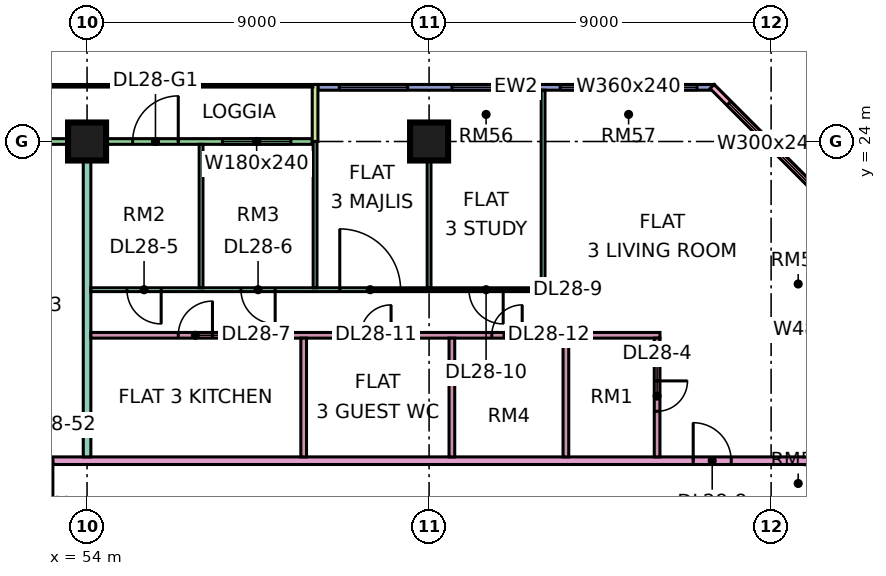
"""IFC4 building model, lengths in metres.
Left out: names, types, materials, properties, quantities, classifications, styles, units other than length and angle.
Written with IfcOpenShell. Run it as: python <this file> out.ifc"""

import sys

from ifc_helpers import new_model, si_unit, direction, frame, frame_2d, origin, origin_2d, place, context, subcontext, project, spatial, rectangle, extrude, element, fill, save


model = new_model("IFC4")
c1 = context("Model", 3, precision=1e-05, world=origin(), true_north=direction((0.0, 1.0)))
c2 = subcontext(c1, "Body", "Model", "MODEL_VIEW")
j1 = project(units=[si_unit("LENGTHUNIT", "METRE"), si_unit("PLANEANGLEUNIT", "RADIAN")], contexts=[c1])
p1 = place(None, origin())
s1 = spatial("IfcSite", under=j1, at=p1, CompositionType="ELEMENT")
p2 = place(p1, origin())
s2 = spatial("IfcBuilding", under=s1, at=p2, CompositionType="ELEMENT")
p3 = place(p2, frame((0.0, 0.0, 121.9)))
s3 = spatial("IfcBuildingStorey", under=s2, at=p3, CompositionType="ELEMENT", Elevation=121.9)
for number, where, z_axis, x_axis in (
    (1, (54.0, 24.0, 0.0), (0.0, 0.0, 1.0), (1.0, 0.0, 0.0)),
    (2, (63.0, 24.0, 0.0), (0.0, 0.0, 1.0), (1.0, 0.0, 0.0)),
):
    element("IfcColumn", number, at=place(p3, frame(where, z_axis=z_axis, x_axis=x_axis)), inside=s3, PredefinedType="COLUMN", context=c2, shape_type="SweptSolid", body=[
        extrude(rectangle(XDim=1.0, YDim=1.0, at=origin_2d()), origin(), (0.0, 0.0, 1.0), 3.75),
    ])
p4 = place(p3, frame((70.5, 25.425, 0.0), z_axis=(0.0, 0.0, 1.0), x_axis=(-1.0, 0.0, 0.0)))
e3 = element("IfcWall", 3, at=p4, inside=s3, PredefinedType="SOLIDWALL", context=c2, shape_type="SweptSolid", body=[
    extrude(rectangle(XDim=10.425, YDim=0.15, at=frame_2d((5.212, 0.0))), origin(), (0.0, 0.0, 1.0), 3.35),
])
p5 = place(p4, frame((0.45, 0.0, 0.45)))
e4 = element("IfcOpeningElement", 4, at=p5, cuts=e3, PredefinedType="OPENING", context=c2, shape_type="SweptSolid", body=[
    extrude(rectangle(XDim=3.6, YDim=2.4, at=frame_2d((1.8, 1.2))), frame((0.0, 0.085, 0.0), z_axis=(0.0, -1.0, 0.0), x_axis=(1.0, 0.0, 0.0)), (0.0, 0.0, 1.0), 0.17),
])
p6 = place(p4, frame((5.1, 0.0, 0.45)))
e5 = element("IfcOpeningElement", 5, at=p6, cuts=e3, PredefinedType="OPENING", context=c2, shape_type="SweptSolid", body=[
    extrude(rectangle(XDim=1.8, YDim=2.4, at=frame_2d((0.9, 1.2))), frame((0.0, 0.085, 0.0), z_axis=(0.0, -1.0, 0.0), x_axis=(1.0, 0.0, 0.0)), (0.0, 0.0, 1.0), 0.17),
])
p7 = place(p4, frame((8.062, 0.0, 0.45)))
e6 = element("IfcOpeningElement", 6, at=p7, cuts=e3, PredefinedType="OPENING", context=c2, shape_type="SweptSolid", body=[
    extrude(rectangle(XDim=1.8, YDim=2.4, at=frame_2d((0.9, 1.2))), frame((0.0, 0.085, 0.0), z_axis=(0.0, -1.0, 0.0), x_axis=(1.0, 0.0, 0.0)), (0.0, 0.0, 1.0), 0.17),
])
p8 = place(p3, frame((59.925, 24.0, 0.0), z_axis=(0.0, 0.0, 1.0), x_axis=(-1.0, 0.0, 0.0)))
e7 = element("IfcWall", 7, at=p8, inside=s3, PredefinedType="SOLIDWALL", context=c2, shape_type="SweptSolid", body=[
    extrude(rectangle(XDim=11.85, YDim=0.15, at=frame_2d((5.925, 0.0))), origin(), (0.0, 0.0, 1.0), 3.35),
])
p9 = place(p8, frame((0.562, 0.0, 0.45)))
e8 = element("IfcOpeningElement", 8, at=p9, cuts=e7, PredefinedType="OPENING", context=c2, shape_type="SweptSolid", body=[
    extrude(rectangle(XDim=1.8, YDim=2.4, at=frame_2d((0.9, 1.2))), frame((0.0, 0.085, 0.0), z_axis=(0.0, -1.0, 0.0), x_axis=(1.0, 0.0, 0.0)), (0.0, 0.0, 1.0), 0.17),
])
p10 = place(p8, frame((3.525, 0.0, 0.0)))
e9 = element("IfcOpeningElement", 9, at=p10, cuts=e7, PredefinedType="OPENING", context=c2, shape_type="SweptSolid", body=[
    extrude(rectangle(XDim=1.2, YDim=2.4, at=frame_2d((0.6, 1.2))), frame((0.0, 0.085, 0.0), z_axis=(0.0, -1.0, 0.0), x_axis=(1.0, 0.0, 0.0)), (0.0, 0.0, 1.0), 0.17),
])
p11 = place(p8, frame((7.087, 0.0, 0.45)))
e10 = element("IfcOpeningElement", 10, at=p11, cuts=e7, PredefinedType="OPENING", context=c2, shape_type="SweptSolid", body=[
    extrude(rectangle(XDim=4.2, YDim=2.4, at=frame_2d((2.1, 1.2))), frame((0.0, 0.085, 0.0), z_axis=(0.0, -1.0, 0.0), x_axis=(1.0, 0.0, 0.0)), (0.0, 0.0, 1.0), 0.17),
])
p12 = place(p3, frame((60.0, 25.5, 0.0), z_axis=(0.0, 0.0, 1.0), x_axis=(0.0, -1.0, 0.0)))
e11 = element("IfcWall", 11, at=p12, inside=s3, PredefinedType="SOLIDWALL", context=c2, shape_type="SweptSolid", body=[
    extrude(rectangle(XDim=1.5, YDim=0.15, at=frame_2d((0.75, 0.0))), origin(), (0.0, 0.0, 1.0), 3.35),
])
p13 = place(p3, frame((73.447, 22.447, 0.0), z_axis=(0.0, 0.0, 1.0), x_axis=(-0.707106781187, 0.707106781187, 0.0)))
e12 = element("IfcWall", 12, at=p13, inside=s3, PredefinedType="SOLIDWALL", context=c2, shape_type="SweptSolid", body=[
    extrude(rectangle(XDim=4.243, YDim=0.15, at=frame_2d((2.121, 0.0))), origin(), (0.0, 0.0, 1.0), 3.35),
])
p14 = place(p13, frame((0.621, 0.0, 0.45)))
e13 = element("IfcOpeningElement", 13, at=p14, cuts=e12, PredefinedType="OPENING", context=c2, shape_type="SweptSolid", body=[
    extrude(rectangle(XDim=3.0, YDim=2.4, at=frame_2d((1.5, 1.2))), frame((0.0, 0.085, 0.0), z_axis=(0.0, -1.0, 0.0), x_axis=(1.0, 0.0, 0.0)), (0.0, 0.0, 1.0), 0.17),
])
p15 = place(p3, frame((51.225, 15.6, 0.0), z_axis=(0.0, 0.0, 1.0), x_axis=(1.0, 0.0, 0.0)))
e14 = element("IfcWall", 14, at=p15, inside=s3, PredefinedType="PARTITIONING", context=c2, shape_type="SweptSolid", body=[
    extrude(rectangle(XDim=22.125, YDim=0.2, at=frame_2d((11.062, 0.0))), origin(), (0.0, 0.0, 1.0), 3.35),
])
p16 = place(p15, frame((18.725, 0.0, 0.0)))
e15 = element("IfcOpeningElement", 15, at=p16, cuts=e14, PredefinedType="OPENING", context=c2, shape_type="SweptSolid", body=[
    extrude(rectangle(XDim=1.0, YDim=2.1, at=frame_2d((0.5, 1.05))), frame((0.0, 0.11, 0.0), z_axis=(0.0, -1.0, 0.0), x_axis=(1.0, 0.0, 0.0)), (0.0, 0.0, 1.0), 0.22),
])
p17 = place(p15, frame((0.875, 0.0, 0.0)))
e16 = element("IfcOpeningElement", 16, at=p17, cuts=e14, PredefinedType="OPENING", context=c2, shape_type="SweptSolid", body=[
    extrude(rectangle(XDim=1.0, YDim=2.1, at=frame_2d((0.5, 1.05))), frame((0.0, 0.11, 0.0), z_axis=(0.0, -1.0, 0.0), x_axis=(1.0, 0.0, 0.0)), (0.0, 0.0, 1.0), 0.22),
])
p18 = place(p3, frame((54.0, 15.7, 0.0), z_axis=(0.0, 0.0, 1.0), x_axis=(0.0, 1.0, 0.0)))
e17 = element("IfcWall", 17, at=p18, inside=s3, PredefinedType="PARTITIONING", context=c2, shape_type="SweptSolid", body=[
    extrude(rectangle(XDim=8.226, YDim=0.2, at=frame_2d((4.113, 0.0))), origin(), (0.0, 0.0, 1.0), 3.35),
])
p19 = place(p3, frame((54.1, 18.9, 0.0), z_axis=(0.0, 0.0, 1.0), x_axis=(1.0, 0.0, 0.0)))
e18 = element("IfcWall", 18, at=p19, inside=s3, PredefinedType="PARTITIONING", context=c2, shape_type="SweptSolid", body=[
    extrude(rectangle(XDim=14.975, YDim=0.15, at=frame_2d((7.487, 0.0))), origin(), (0.0, 0.0, 1.0), 3.35),
])
p20 = place(p19, frame((2.3, 0.0, 0.0)))
e19 = element("IfcOpeningElement", 19, at=p20, cuts=e18, PredefinedType="OPENING", context=c2, shape_type="SweptSolid", body=[
    extrude(rectangle(XDim=0.9, YDim=2.1, at=frame_2d((0.45, 1.05))), frame((0.0, 0.085, 0.0), z_axis=(0.0, -1.0, 0.0), x_axis=(1.0, 0.0, 0.0)), (0.0, 0.0, 1.0), 0.17),
])
p21 = place(p19, frame((7.1, 0.0, 0.0)))
e20 = element("IfcOpeningElement", 20, at=p21, cuts=e18, PredefinedType="OPENING", context=c2, shape_type="SweptSolid", body=[
    extrude(rectangle(XDim=0.8, YDim=2.1, at=frame_2d((0.4, 1.05))), frame((0.0, 0.085, 0.0), z_axis=(0.0, -1.0, 0.0), x_axis=(1.0, 0.0, 0.0)), (0.0, 0.0, 1.0), 0.17),
])
p22 = place(p19, frame((10.55, 0.0, 0.0)))
e21 = element("IfcOpeningElement", 21, at=p22, cuts=e18, PredefinedType="OPENING", context=c2, shape_type="SweptSolid", body=[
    extrude(rectangle(XDim=0.8, YDim=2.1, at=frame_2d((0.4, 1.05))), frame((0.0, 0.085, 0.0), z_axis=(0.0, -1.0, 0.0), x_axis=(1.0, 0.0, 0.0)), (0.0, 0.0, 1.0), 0.17),
])
p23 = place(p3, frame((54.1, 20.1, 0.0), z_axis=(0.0, 0.0, 1.0), x_axis=(1.0, 0.0, 0.0)))
e22 = element("IfcWall", 22, at=p23, inside=s3, PredefinedType="PARTITIONING", context=c2, shape_type="SweptSolid", body=[
    extrude(rectangle(XDim=11.95, YDim=0.1, at=frame_2d((5.975, 0.0))), origin(), (0.0, 0.0, 1.0), 3.35),
])
p24 = place(p23, frame((0.95, 0.0, 0.0)))
e23 = element("IfcOpeningElement", 23, at=p24, cuts=e22, PredefinedType="OPENING", context=c2, shape_type="SweptSolid", body=[
    extrude(rectangle(XDim=0.9, YDim=2.1, at=frame_2d((0.45, 1.05))), frame((0.0, 0.06, 0.0), z_axis=(0.0, -1.0, 0.0), x_axis=(1.0, 0.0, 0.0)), (0.0, 0.0, 1.0), 0.12),
])
p25 = place(p23, frame((3.95, 0.0, 0.0)))
e24 = element("IfcOpeningElement", 24, at=p25, cuts=e22, PredefinedType="OPENING", context=c2, shape_type="SweptSolid", body=[
    extrude(rectangle(XDim=0.9, YDim=2.1, at=frame_2d((0.45, 1.05))), frame((0.0, 0.06, 0.0), z_axis=(0.0, -1.0, 0.0), x_axis=(1.0, 0.0, 0.0)), (0.0, 0.0, 1.0), 0.12),
])
p26 = place(p23, frame((6.55, 0.0, 0.0)))
e25 = element("IfcOpeningElement", 25, at=p26, cuts=e22, PredefinedType="OPENING", context=c2, shape_type="SweptSolid", body=[
    extrude(rectangle(XDim=1.6, YDim=2.1, at=frame_2d((0.8, 1.05))), frame((0.0, 0.06, 0.0), z_axis=(0.0, -1.0, 0.0), x_axis=(1.0, 0.0, 0.0)), (0.0, 0.0, 1.0), 0.12),
])
p27 = place(p23, frame((9.95, 0.0, 0.0)))
e26 = element("IfcOpeningElement", 26, at=p27, cuts=e22, PredefinedType="OPENING", context=c2, shape_type="SweptSolid", body=[
    extrude(rectangle(XDim=0.9, YDim=2.1, at=frame_2d((0.45, 1.05))), frame((0.0, 0.06, 0.0), z_axis=(0.0, -1.0, 0.0), x_axis=(1.0, 0.0, 0.0)), (0.0, 0.0, 1.0), 0.12),
])
p28 = place(p3, frame((57.0, 20.15, 0.0), z_axis=(0.0, 0.0, 1.0), x_axis=(0.0, 1.0, 0.0)))
e27 = element("IfcWall", 27, at=p28, inside=s3, PredefinedType="PARTITIONING", context=c2, shape_type="SweptSolid", body=[
    extrude(rectangle(XDim=3.776, YDim=0.1, at=frame_2d((1.888, 0.0))), origin(), (0.0, 0.0, 1.0), 3.35),
])
p29 = place(p3, frame((59.7, 15.7, 0.0), z_axis=(0.0, 0.0, 1.0), x_axis=(0.0, 1.0, 0.0)))
e28 = element("IfcWall", 28, at=p29, inside=s3, PredefinedType="PARTITIONING", context=c2, shape_type="SweptSolid", body=[
    extrude(rectangle(XDim=3.125, YDim=0.15, at=frame_2d((1.562, 0.0))), origin(), (0.0, 0.0, 1.0), 3.35),
])
for number, where, z_axis, x_axis in (
    (29, (60.0, 20.15, 0.0), (0.0, 0.0, 1.0), (0.0, 1.0, 0.0)),
    (30, (63.0, 20.15, 0.0), (0.0, 0.0, 1.0), (0.0, 1.0, 0.0)),
):
    element("IfcWall", number, at=place(p3, frame(where, z_axis=z_axis, x_axis=x_axis)), inside=s3, PredefinedType="PARTITIONING", context=c2, shape_type="SweptSolid", body=[
        extrude(rectangle(XDim=3.85, YDim=0.1, at=frame_2d((1.925, 0.0))), origin(), (0.0, 0.0, 1.0), 3.35),
    ])
p30 = place(p3, frame((63.6, 15.7, 0.0), z_axis=(0.0, 0.0, 1.0), x_axis=(0.0, 1.0, 0.0)))
e31 = element("IfcWall", 31, at=p30, inside=s3, PredefinedType="PARTITIONING", context=c2, shape_type="SweptSolid", body=[
    extrude(rectangle(XDim=3.125, YDim=0.15, at=frame_2d((1.562, 0.0))), origin(), (0.0, 0.0, 1.0), 3.35),
])
p31 = place(p3, frame((66.0, 20.15, 0.0), z_axis=(0.0, 0.0, 1.0), x_axis=(0.0, 1.0, 0.0)))
e32 = element("IfcWall", 32, at=p31, inside=s3, PredefinedType="PARTITIONING", context=c2, shape_type="SweptSolid", body=[
    extrude(rectangle(XDim=5.2, YDim=0.1, at=frame_2d((2.6, 0.0))), origin(), (0.0, 0.0, 1.0), 3.35),
])
p32 = place(p3, frame((66.6, 15.7, 0.0), z_axis=(0.0, 0.0, 1.0), x_axis=(0.0, 1.0, 0.0)))
e33 = element("IfcWall", 33, at=p32, inside=s3, PredefinedType="PARTITIONING", context=c2, shape_type="SweptSolid", body=[
    extrude(rectangle(XDim=3.125, YDim=0.15, at=frame_2d((1.562, 0.0))), origin(), (0.0, 0.0, 1.0), 3.35),
])
p33 = place(p3, frame((69.0, 15.7, 0.0), z_axis=(0.0, 0.0, 1.0), x_axis=(0.0, 1.0, 0.0)))
e34 = element("IfcWall", 34, at=p33, inside=s3, PredefinedType="PARTITIONING", context=c2, shape_type="SweptSolid", body=[
    extrude(rectangle(XDim=3.125, YDim=0.15, at=frame_2d((1.562, 0.0))), origin(), (0.0, 0.0, 1.0), 3.35),
])
p34 = place(p33, frame((1.2, 0.0, 0.0)))
e35 = element("IfcOpeningElement", 35, at=p34, cuts=e34, PredefinedType="OPENING", context=c2, shape_type="SweptSolid", body=[
    extrude(rectangle(XDim=0.8, YDim=2.1, at=frame_2d((0.4, 1.05))), frame((0.0, 0.085, 0.0), z_axis=(0.0, -1.0, 0.0), x_axis=(1.0, 0.0, 0.0)), (0.0, 0.0, 1.0), 0.17),
])
p35 = place(p5, origin())
e36 = element("IfcWindow", 36, at=p35, inside=s3, PartitioningType="SINGLE_PANEL", PredefinedType="WINDOW", context=c2, shape_type="SweptSolid", body=[
    extrude(rectangle(XDim=3.6, YDim=2.4, at=frame_2d((1.8, 1.2))), frame((0.0, 0.03, 0.0), z_axis=(0.0, -1.0, 0.0), x_axis=(1.0, 0.0, 0.0)), (0.0, 0.0, 1.0), 0.06),
])
fill(e4, e36)
p36 = place(p6, origin())
e37 = element("IfcWindow", 37, at=p36, inside=s3, PartitioningType="SINGLE_PANEL", PredefinedType="WINDOW", context=c2, shape_type="SweptSolid", body=[
    extrude(rectangle(XDim=1.8, YDim=2.4, at=frame_2d((0.9, 1.2))), frame((0.0, 0.03, 0.0), z_axis=(0.0, -1.0, 0.0), x_axis=(1.0, 0.0, 0.0)), (0.0, 0.0, 1.0), 0.06),
])
fill(e5, e37)
p37 = place(p7, origin())
e38 = element("IfcWindow", 38, at=p37, inside=s3, PartitioningType="SINGLE_PANEL", PredefinedType="WINDOW", context=c2, shape_type="SweptSolid", body=[
    extrude(rectangle(XDim=1.8, YDim=2.4, at=frame_2d((0.9, 1.2))), frame((0.0, 0.03, 0.0), z_axis=(0.0, -1.0, 0.0), x_axis=(1.0, 0.0, 0.0)), (0.0, 0.0, 1.0), 0.06),
])
fill(e6, e38)
p38 = place(p9, origin())
e39 = element("IfcWindow", 39, at=p38, inside=s3, PartitioningType="SINGLE_PANEL", PredefinedType="WINDOW", context=c2, shape_type="SweptSolid", body=[
    extrude(rectangle(XDim=1.8, YDim=2.4, at=frame_2d((0.9, 1.2))), frame((0.0, 0.03, 0.0), z_axis=(0.0, -1.0, 0.0), x_axis=(1.0, 0.0, 0.0)), (0.0, 0.0, 1.0), 0.06),
])
fill(e8, e39)
p39 = place(p10, frame((1.2, 0.0, 0.0), z_axis=(0.0, 0.0, 1.0), x_axis=(-1.0, 0.0, 0.0)))
e40 = element("IfcDoor", 40, at=p39, inside=s3, OperationType="DOUBLE_DOOR_SINGLE_SWING", PredefinedType="DOOR", context=c2, shape_type="SweptSolid", body=[
    extrude(rectangle(XDim=1.2, YDim=2.4, at=frame_2d((0.6, 1.2))), frame((0.0, 0.025, 0.0), z_axis=(0.0, -1.0, 0.0), x_axis=(1.0, 0.0, 0.0)), (0.0, 0.0, 1.0), 0.05),
])
fill(e9, e40)
p40 = place(p14, origin())
e41 = element("IfcWindow", 41, at=p40, inside=s3, PartitioningType="SINGLE_PANEL", PredefinedType="WINDOW", context=c2, shape_type="SweptSolid", body=[
    extrude(rectangle(XDim=3.0, YDim=2.4, at=frame_2d((1.5, 1.2))), frame((0.0, 0.03, 0.0), z_axis=(0.0, -1.0, 0.0), x_axis=(1.0, 0.0, 0.0)), (0.0, 0.0, 1.0), 0.06),
])
fill(e13, e41)
p41 = place(p34, origin())
e42 = element("IfcDoor", 42, at=p41, inside=s3, OperationType="SINGLE_SWING_RIGHT", PredefinedType="DOOR", context=c2, shape_type="SweptSolid", body=[
    extrude(rectangle(XDim=0.8, YDim=2.1, at=frame_2d((0.4, 1.05))), frame((0.0, 0.025, 0.0), z_axis=(0.0, -1.0, 0.0), x_axis=(1.0, 0.0, 0.0)), (0.0, 0.0, 1.0), 0.05),
])
fill(e35, e42)
p42 = place(p24, origin())
e43 = element("IfcDoor", 43, at=p42, inside=s3, OperationType="SINGLE_SWING_RIGHT", PredefinedType="DOOR", context=c2, shape_type="SweptSolid", body=[
    extrude(rectangle(XDim=0.9, YDim=2.1, at=frame_2d((0.45, 1.05))), frame((0.0, 0.025, 0.0), z_axis=(0.0, -1.0, 0.0), x_axis=(1.0, 0.0, 0.0)), (0.0, 0.0, 1.0), 0.05),
])
fill(e23, e43)
p43 = place(p25, origin())
e44 = element("IfcDoor", 44, at=p43, inside=s3, OperationType="SINGLE_SWING_RIGHT", PredefinedType="DOOR", context=c2, shape_type="SweptSolid", body=[
    extrude(rectangle(XDim=0.9, YDim=2.1, at=frame_2d((0.45, 1.05))), frame((0.0, 0.025, 0.0), z_axis=(0.0, -1.0, 0.0), x_axis=(1.0, 0.0, 0.0)), (0.0, 0.0, 1.0), 0.05),
])
fill(e24, e44)
p44 = place(p20, frame((0.9, 0.0, 0.0), z_axis=(0.0, 0.0, 1.0), x_axis=(-1.0, 0.0, 0.0)))
e45 = element("IfcDoor", 45, at=p44, inside=s3, OperationType="SINGLE_SWING_RIGHT", PredefinedType="DOOR", context=c2, shape_type="SweptSolid", body=[
    extrude(rectangle(XDim=0.9, YDim=2.1, at=frame_2d((0.45, 1.05))), frame((0.0, 0.025, 0.0), z_axis=(0.0, -1.0, 0.0), x_axis=(1.0, 0.0, 0.0)), (0.0, 0.0, 1.0), 0.05),
])
fill(e19, e45)
p45 = place(p16, origin())
e46 = element("IfcDoor", 46, at=p45, inside=s3, OperationType="SINGLE_SWING_LEFT", PredefinedType="DOOR", context=c2, shape_type="SweptSolid", body=[
    extrude(rectangle(XDim=1.0, YDim=2.1, at=frame_2d((0.5, 1.05))), frame((0.0, 0.025, 0.0), z_axis=(0.0, -1.0, 0.0), x_axis=(1.0, 0.0, 0.0)), (0.0, 0.0, 1.0), 0.05),
])
fill(e15, e46)
p46 = place(p26, origin())
e47 = element("IfcDoor", 47, at=p46, inside=s3, OperationType="DOUBLE_DOOR_SINGLE_SWING", PredefinedType="DOOR", context=c2, shape_type="SweptSolid", body=[
    extrude(rectangle(XDim=1.6, YDim=2.1, at=frame_2d((0.8, 1.05))), frame((0.0, 0.025, 0.0), z_axis=(0.0, -1.0, 0.0), x_axis=(1.0, 0.0, 0.0)), (0.0, 0.0, 1.0), 0.05),
])
fill(e25, e47)
p47 = place(p27, origin())
e48 = element("IfcDoor", 48, at=p47, inside=s3, OperationType="SINGLE_SWING_RIGHT", PredefinedType="DOOR", context=c2, shape_type="SweptSolid", body=[
    extrude(rectangle(XDim=0.9, YDim=2.1, at=frame_2d((0.45, 1.05))), frame((0.0, 0.025, 0.0), z_axis=(0.0, -1.0, 0.0), x_axis=(1.0, 0.0, 0.0)), (0.0, 0.0, 1.0), 0.05),
])
fill(e26, e48)
p48 = place(p21, frame((0.8, 0.0, 0.0), z_axis=(0.0, 0.0, 1.0), x_axis=(-1.0, 0.0, 0.0)))
e49 = element("IfcDoor", 49, at=p48, inside=s3, OperationType="SINGLE_SWING_RIGHT", PredefinedType="DOOR", context=c2, shape_type="SweptSolid", body=[
    extrude(rectangle(XDim=0.8, YDim=2.1, at=frame_2d((0.4, 1.05))), frame((0.0, 0.025, 0.0), z_axis=(0.0, -1.0, 0.0), x_axis=(1.0, 0.0, 0.0)), (0.0, 0.0, 1.0), 0.05),
])
fill(e20, e49)
p49 = place(p22, frame((0.8, 0.0, 0.0), z_axis=(0.0, 0.0, 1.0), x_axis=(-1.0, 0.0, 0.0)))
e50 = element("IfcDoor", 50, at=p49, inside=s3, OperationType="SINGLE_SWING_RIGHT", PredefinedType="DOOR", context=c2, shape_type="SweptSolid", body=[
    extrude(rectangle(XDim=0.8, YDim=2.1, at=frame_2d((0.4, 1.05))), frame((0.0, 0.025, 0.0), z_axis=(0.0, -1.0, 0.0), x_axis=(1.0, 0.0, 0.0)), (0.0, 0.0, 1.0), 0.05),
])
fill(e21, e50)
p50 = place(p17, origin())
e51 = element("IfcDoor", 51, at=p50, inside=s3, OperationType="SINGLE_SWING_RIGHT", PredefinedType="DOOR", context=c2, shape_type="SweptSolid", body=[
    extrude(rectangle(XDim=1.0, YDim=2.1, at=frame_2d((0.5, 1.05))), frame((0.0, 0.025, 0.0), z_axis=(0.0, -1.0, 0.0), x_axis=(1.0, 0.0, 0.0)), (0.0, 0.0, 1.0), 0.05),
])
fill(e16, e51)
save(model, sys.argv[1])
